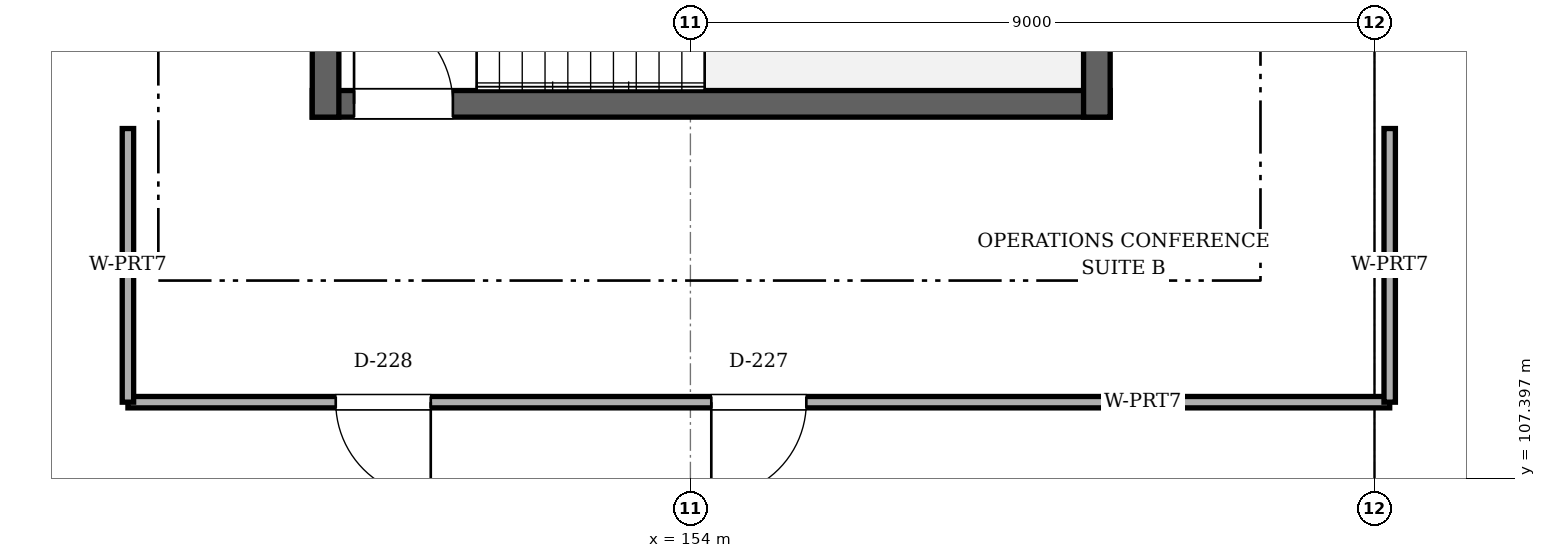
"""IFC4 building model, lengths in metres.
Left out: names, types, materials, properties, quantities, classifications, styles, units other than length and angle.
Written with IfcOpenShell. Run it as: python <this file> out.ifc"""

import sys

from ifc_helpers import new_model, si_unit, direction, frame, frame_2d, origin, place, context, subcontext, project, spatial, rectangle, extrude, element, fill, save


model = new_model("IFC4")
c1 = context("Model", 3, precision=1e-05, world=origin(), true_north=direction((0.0, 1.0)))
c2 = subcontext(c1, "Body", "Model", "MODEL_VIEW")
j1 = project(units=[si_unit("LENGTHUNIT", "METRE"), si_unit("PLANEANGLEUNIT", "RADIAN")], contexts=[c1])
p1 = place(None, origin())
s1 = spatial("IfcSite", under=j1, at=p1, CompositionType="ELEMENT")
p2 = place(p1, origin())
s2 = spatial("IfcBuilding", under=s1, at=p2, CompositionType="ELEMENT")
p3 = place(p2, frame((0.0, 0.0, 14.4)))
s3 = spatial("IfcBuildingStorey", under=s2, at=p3, CompositionType="ELEMENT", Elevation=14.4)
p4 = place(p3, frame((149.025, 112.325, 0.0), z_axis=(0.0, 0.0, 1.0), x_axis=(1.0, 0.0, 0.0)))
e1 = element("IfcWall", 1, at=p4, inside=s3, PredefinedType="SHEAR", context=c2, shape_type="SweptSolid", body=[
    extrude(rectangle(XDim=10.498, YDim=0.35, at=frame_2d((5.249, 0.0))), origin(), (0.0, 0.0, 1.0), 3.0),
])
p5 = place(p4, frame((0.55, 0.0, 0.0)))
e2 = element("IfcOpeningElement", 2, at=p5, cuts=e1, PredefinedType="OPENING", context=c2, shape_type="SweptSolid", body=[
    extrude(rectangle(XDim=1.3, YDim=2.1, at=frame_2d((0.65, 1.05))), frame((0.0, 0.185, 0.0), z_axis=(0.0, -1.0, 0.0), x_axis=(1.0, 0.0, 0.0)), (0.0, 0.0, 1.0), 0.37),
])
for number, where, z_axis, x_axis in (
    (3, (159.347, 112.15, 0.0), (0.0, 0.0, 1.0), (0.0, 1.0, 0.0)),
    (4, (149.2, 116.47, 0.0), (0.0, 0.0, 1.0), (0.0, -1.0, 0.0)),
):
    element("IfcWall", number, at=place(p3, frame(where, z_axis=z_axis, x_axis=x_axis)), inside=s3, PredefinedType="SHEAR", context=c2, shape_type="SweptSolid", body=[
        extrude(rectangle(XDim=4.32, YDim=0.35, at=frame_2d((2.16, 0.0))), origin(), (0.0, 0.0, 1.0), 3.0),
    ])
p6 = place(p3, frame((163.2, 108.4, 0.0), z_axis=(0.0, 0.0, 1.0), x_axis=(-1.0, 0.0, 0.0)))
e5 = element("IfcWall", 5, at=p6, inside=s3, PredefinedType="PARTITIONING", context=c2, shape_type="SweptSolid", body=[
    extrude(rectangle(XDim=16.6, YDim=0.15, at=frame_2d((8.3, 0.0))), origin(), (0.0, 0.0, 1.0), 2.375),
])
p7 = place(p6, frame((7.675, 0.0, 0.0)))
e6 = element("IfcOpeningElement", 6, at=p7, cuts=e5, PredefinedType="OPENING", context=c2, shape_type="SweptSolid", body=[
    extrude(rectangle(XDim=1.25, YDim=2.1, at=frame_2d((0.625, 1.05))), frame((0.0, 0.085, 0.0), z_axis=(0.0, -1.0, 0.0), x_axis=(1.0, 0.0, 0.0)), (0.0, 0.0, 1.0), 0.17),
])
p8 = place(p6, frame((12.616, 0.0, 0.0)))
e7 = element("IfcOpeningElement", 7, at=p8, cuts=e5, PredefinedType="OPENING", context=c2, shape_type="SweptSolid", body=[
    extrude(rectangle(XDim=1.25, YDim=2.1, at=frame_2d((0.625, 1.05))), frame((0.0, 0.085, 0.0), z_axis=(0.0, -1.0, 0.0), x_axis=(1.0, 0.0, 0.0)), (0.0, 0.0, 1.0), 0.17),
])
p9 = place(p3, frame((146.6, 108.4, 0.0), z_axis=(0.0, 0.0, 1.0), x_axis=(0.0, 1.0, 0.0)))
e8 = element("IfcWall", 8, at=p9, inside=s3, PredefinedType="PARTITIONING", context=c2, shape_type="SweptSolid", body=[
    extrude(rectangle(XDim=3.6, YDim=0.15, at=frame_2d((1.8, 0.0))), origin(), (0.0, 0.0, 1.0), 2.975),
])
p10 = place(p3, frame((163.2, 112.0, 0.0), z_axis=(0.0, 0.0, 1.0), x_axis=(0.0, -1.0, 0.0)))
e9 = element("IfcWall", 9, at=p10, inside=s3, PredefinedType="PARTITIONING", context=c2, shape_type="SweptSolid", body=[
    extrude(rectangle(XDim=3.6, YDim=0.15, at=frame_2d((1.8, 0.0))), origin(), (0.0, 0.0, 1.0), 2.375),
])
p11 = place(p5, origin())
e10 = element("IfcDoor", 10, at=p11, inside=s3, OperationType="SINGLE_SWING_LEFT", PredefinedType="DOOR", context=c2, shape_type="SweptSolid", body=[
    extrude(rectangle(XDim=1.3, YDim=2.1, at=frame_2d((0.65, 1.05))), frame((0.0, 0.025, 0.0), z_axis=(0.0, -1.0, 0.0), x_axis=(1.0, 0.0, 0.0)), (0.0, 0.0, 1.0), 0.05),
])
fill(e2, e10)
p12 = place(p7, origin())
e11 = element("IfcDoor", 11, at=p12, inside=s3, OperationType="SINGLE_SWING_RIGHT", PredefinedType="DOOR", context=c2, shape_type="SweptSolid", body=[
    extrude(rectangle(XDim=1.25, YDim=2.1, at=frame_2d((0.625, 1.05))), frame((0.0, 0.025, 0.0), z_axis=(0.0, -1.0, 0.0), x_axis=(1.0, 0.0, 0.0)), (0.0, 0.0, 1.0), 0.05),
])
fill(e6, e11)
p13 = place(p8, origin())
e12 = element("IfcDoor", 12, at=p13, inside=s3, OperationType="SINGLE_SWING_LEFT", PredefinedType="DOOR", context=c2, shape_type="SweptSolid", body=[
    extrude(rectangle(XDim=1.25, YDim=2.1, at=frame_2d((0.625, 1.05))), frame((0.0, 0.025, 0.0), z_axis=(0.0, -1.0, 0.0), x_axis=(1.0, 0.0, 0.0)), (0.0, 0.0, 1.0), 0.05),
])
fill(e7, e12)
save(model, sys.argv[1])
